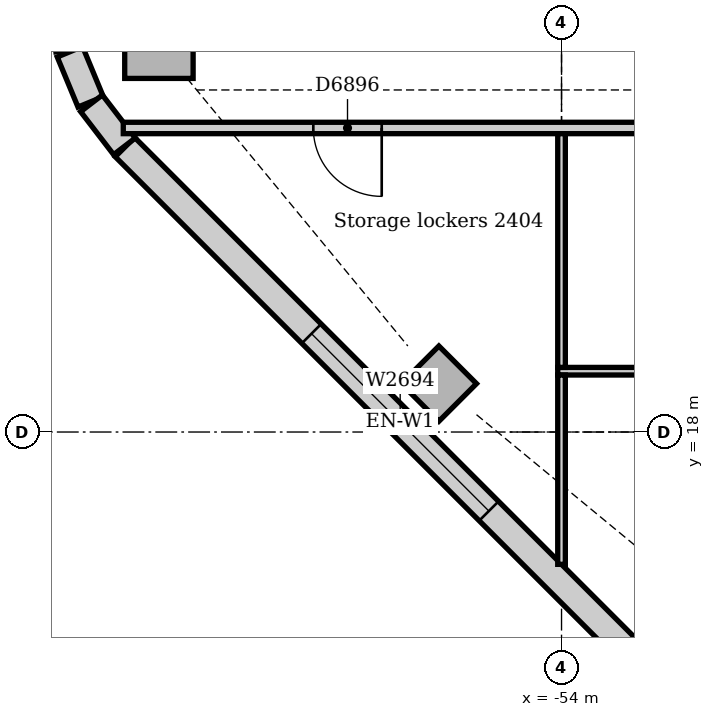
"""IFC4 building model, lengths in metres.
Left out: names, types, materials, properties, quantities, classifications, styles, units other than length and angle.
Written with IfcOpenShell. Run it as: python <this file> out.ifc"""

import sys

from ifc_helpers import new_model, si_unit, direction, frame, frame_2d, origin, origin_2d, place, context, subcontext, project, spatial, rectangle, extrude, element, fill, save


model = new_model("IFC4")
c1 = context("Model", 3, precision=1e-05, world=origin(), true_north=direction((0.0, 1.0)))
c2 = subcontext(c1, "Body", "Model", "MODEL_VIEW")
j1 = project(units=[si_unit("LENGTHUNIT", "METRE"), si_unit("PLANEANGLEUNIT", "RADIAN")], contexts=[c1])
p1 = place(None, origin())
s1 = spatial("IfcSite", under=j1, at=p1, CompositionType="ELEMENT")
p2 = place(p1, origin())
s2 = spatial("IfcBuilding", under=s1, at=p2, CompositionType="ELEMENT")
p3 = place(p2, frame((0.0, 0.0, 104.0)))
s3 = spatial("IfcBuildingStorey", under=s2, at=p3, CompositionType="ELEMENT", Elevation=104.0)
p4 = place(p3, frame((-59.297, 23.102, 0.0), z_axis=(0.0, 0.0, 1.0), x_axis=(1.0, 0.0, 0.0)))
e1 = element("IfcColumn", 1, at=p4, inside=s3, PredefinedType="COLUMN", context=c2, shape_type="SweptSolid", body=[
    extrude(rectangle(XDim=0.9, YDim=0.9, at=origin_2d()), origin(), (0.0, 0.0, 1.0), 3.85),
])
p5 = place(p3, frame((-55.614, 18.636, 0.0), z_axis=(0.0, 0.0, 1.0), x_axis=(0.707106781187, 0.707106781187, 0.0)))
e2 = element("IfcColumn", 2, at=p5, inside=s3, PredefinedType="COLUMN", context=c2, shape_type="SweptSolid", body=[
    extrude(rectangle(XDim=0.7, YDim=0.7, at=origin_2d()), origin(), (0.0, 0.0, 1.0), 3.85),
])
p6 = place(p3, frame((-59.744, 21.749, 0.0), z_axis=(0.0, 0.0, 1.0), x_axis=(0.707106781187, -0.707106781187, 0.0)))
e3 = element("IfcWall", 3, at=p6, inside=s3, PredefinedType="STANDARD", context=c2, shape_type="SweptSolid", body=[
    extrude(rectangle(XDim=10.243, YDim=0.36, at=frame_2d((5.121, 0.0))), origin(), (0.0, 0.0, 1.0), 3.85),
])
p7 = place(p6, frame((3.471, 0.0, 0.9)))
e4 = element("IfcOpeningElement", 4, at=p7, cuts=e3, PredefinedType="OPENING", context=c2, shape_type="SweptSolid", body=[
    extrude(rectangle(XDim=3.3, YDim=1.6, at=frame_2d((1.65, 0.8))), frame((0.0, 0.19, 0.0), z_axis=(0.0, -1.0, 0.0), x_axis=(1.0, 0.0, 0.0)), (0.0, 0.0, 1.0), 0.38),
])
p8 = place(p3, frame((-60.468, 23.003, 0.0), z_axis=(0.0, 0.0, 1.0), x_axis=(0.382702709855, -0.923871547278, 0.0)))
e5 = element("IfcWall", 5, at=p8, inside=s3, PredefinedType="STANDARD", context=c2, shape_type="SweptSolid", body=[
    extrude(rectangle(XDim=0.713, YDim=0.36, at=frame_2d((0.356, 0.0))), origin(), (0.0, 0.0, 1.0), 3.85),
])
p9 = place(p3, frame((-60.184, 22.325, 0.0), z_axis=(0.0, 0.0, 1.0), x_axis=(0.608802368033, -0.793321924995, 0.0)))
e6 = element("IfcWall", 6, at=p9, inside=s3, PredefinedType="STANDARD", context=c2, shape_type="SweptSolid", body=[
    extrude(rectangle(XDim=0.713, YDim=0.36, at=frame_2d((0.357, 0.0))), origin(), (0.0, 0.0, 1.0), 3.85),
])
p10 = place(p3, frame((-59.766, 22.0, 0.0), z_axis=(0.0, 0.0, 1.0), x_axis=(1.0, 0.0, 0.0)))
e7 = element("IfcWall", 7, at=p10, inside=s3, PredefinedType="PARTITIONING", context=c2, shape_type="SweptSolid", body=[
    extrude(rectangle(XDim=17.041, YDim=0.15, at=frame_2d((8.52, 0.0))), origin(), (0.0, 0.0, 1.0), 3.85),
])
p11 = place(p10, frame((15.366, 0.0, 0.0)))
e8 = element("IfcOpeningElement", 8, at=p11, cuts=e7, PredefinedType="OPENING", context=c2, shape_type="SweptSolid", body=[
    extrude(rectangle(XDim=0.9, YDim=2.1, at=frame_2d((0.45, 1.05))), frame((0.0, 0.085, 0.0), z_axis=(0.0, -1.0, 0.0), x_axis=(1.0, 0.0, 0.0)), (0.0, 0.0, 1.0), 0.17),
])
p12 = place(p10, frame((2.5, 0.0, 0.0)))
e9 = element("IfcOpeningElement", 9, at=p12, cuts=e7, PredefinedType="OPENING", context=c2, shape_type="SweptSolid", body=[
    extrude(rectangle(XDim=0.9, YDim=2.1, at=frame_2d((0.45, 1.05))), frame((0.0, 0.085, 0.0), z_axis=(0.0, -1.0, 0.0), x_axis=(1.0, 0.0, 0.0)), (0.0, 0.0, 1.0), 0.17),
])
p13 = place(p10, frame((9.056, 0.0, 0.0)))
e10 = element("IfcOpeningElement", 10, at=p13, cuts=e7, PredefinedType="OPENING", context=c2, shape_type="SweptSolid", body=[
    extrude(rectangle(XDim=1.0, YDim=2.1, at=frame_2d((0.5, 1.05))), frame((0.0, 0.085, 0.0), z_axis=(0.0, -1.0, 0.0), x_axis=(1.0, 0.0, 0.0)), (0.0, 0.0, 1.0), 0.17),
])
p14 = place(p3, frame((-54.05, 18.8, 0.0), z_axis=(0.0, 0.0, 1.0), x_axis=(1.0, 0.0, 0.0)))
e11 = element("IfcWall", 11, at=p14, inside=s3, PredefinedType="PARTITIONING", context=c2, shape_type="SweptSolid", body=[
    extrude(rectangle(XDim=9.1, YDim=0.1, at=frame_2d((4.55, 0.0))), origin(), (0.0, 0.0, 1.0), 3.85),
])
p15 = place(p14, frame((3.39, 0.0, 0.0)))
e12 = element("IfcOpeningElement", 12, at=p15, cuts=e11, PredefinedType="OPENING", context=c2, shape_type="SweptSolid", body=[
    extrude(rectangle(XDim=0.9, YDim=2.1, at=frame_2d((0.45, 1.05))), frame((0.0, 0.06, 0.0), z_axis=(0.0, -1.0, 0.0), x_axis=(1.0, 0.0, 0.0)), (0.0, 0.0, 1.0), 0.12),
])
p16 = place(p3, frame((-54.0, 18.85, 0.0), z_axis=(0.0, 0.0, 1.0), x_axis=(0.0, 1.0, 0.0)))
e13 = element("IfcWall", 13, at=p16, inside=s3, PredefinedType="PARTITIONING", context=c2, shape_type="SweptSolid", body=[
    extrude(rectangle(XDim=3.075, YDim=0.1, at=frame_2d((1.538, 0.0))), origin(), (0.0, 0.0, 1.0), 3.362),
])
p17 = place(p3, frame((-54.0, 16.259, 0.0), z_axis=(0.0, 0.0, 1.0), x_axis=(0.0, 1.0, 0.0)))
e14 = element("IfcWall", 14, at=p17, inside=s3, PredefinedType="PARTITIONING", context=c2, shape_type="SweptSolid", body=[
    extrude(rectangle(XDim=2.491, YDim=0.1, at=frame_2d((1.245, 0.0))), origin(), (0.0, 0.0, 1.0), 3.362),
])
p18 = place(p7, origin())
e15 = element("IfcWindow", 15, at=p18, inside=s3, PartitioningType="SINGLE_PANEL", PredefinedType="WINDOW", context=c2, shape_type="SweptSolid", body=[
    extrude(rectangle(XDim=3.3, YDim=1.6, at=frame_2d((1.65, 0.8))), frame((0.0, 0.13, 0.0), z_axis=(0.0, -1.0, 0.0), x_axis=(1.0, 0.0, 0.0)), (0.0, 0.0, 1.0), 0.06),
])
fill(e4, e15)
p19 = place(p12, frame((0.9, 0.0, 0.0), z_axis=(0.0, 0.0, 1.0), x_axis=(-1.0, 0.0, 0.0)))
e16 = element("IfcDoor", 16, at=p19, inside=s3, OperationType="SINGLE_SWING_LEFT", PredefinedType="DOOR", context=c2, shape_type="SweptSolid", body=[
    extrude(rectangle(XDim=0.9, YDim=2.1, at=frame_2d((0.45, 1.05))), frame((0.0, 0.025, 0.0), z_axis=(0.0, -1.0, 0.0), x_axis=(1.0, 0.0, 0.0)), (0.0, 0.0, 1.0), 0.05),
])
fill(e9, e16)
save(model, sys.argv[1])
